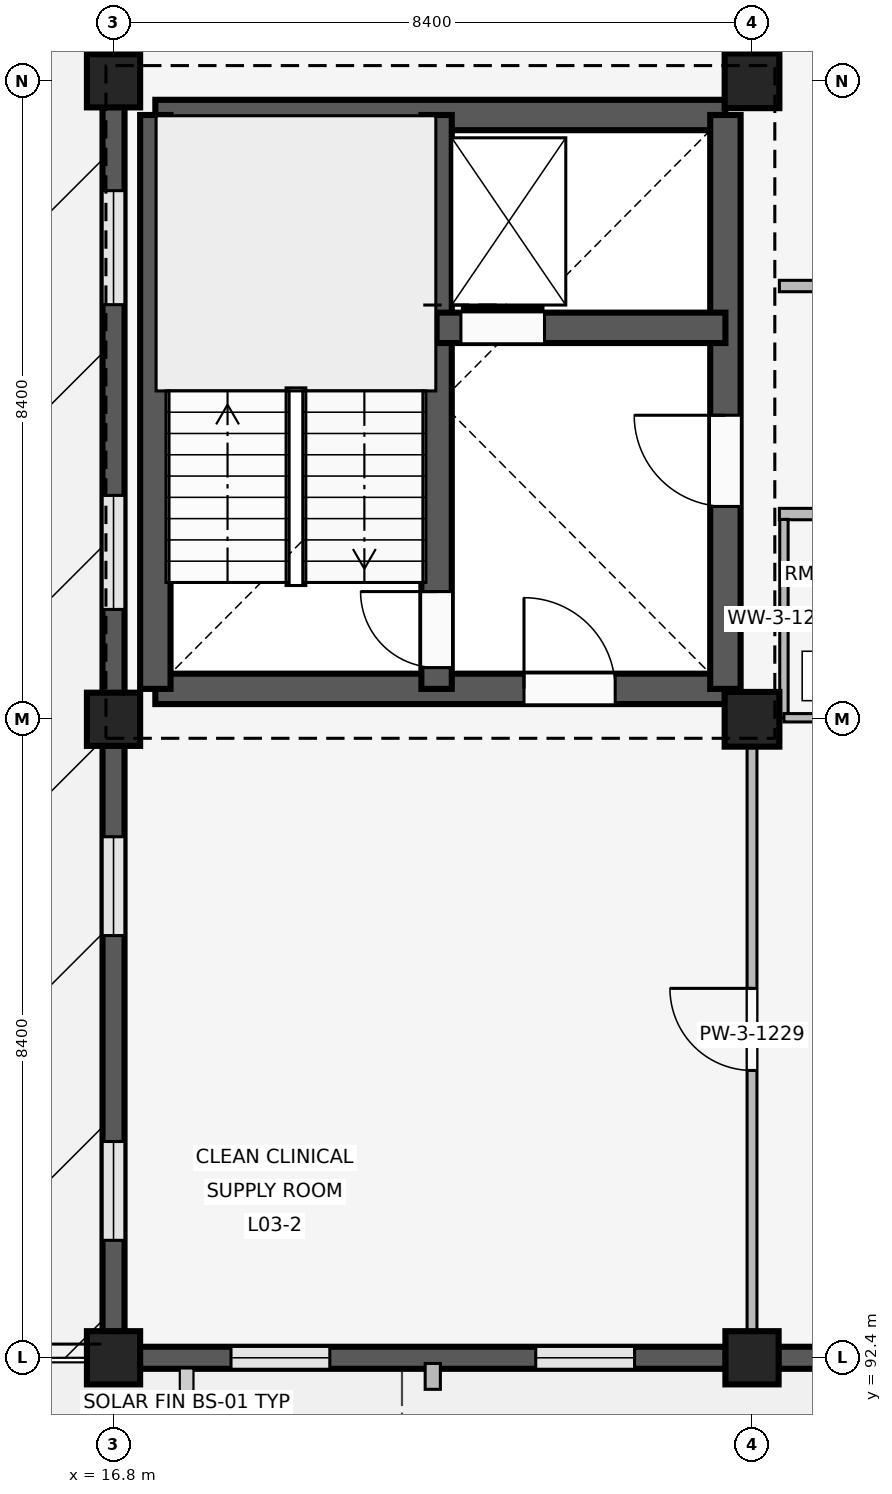
"""IFC4 building model, lengths in metres.
Left out: names, types, materials, properties, quantities, classifications, styles, units other than length and angle.
Written with IfcOpenShell. Run it as: python <this file> out.ifc"""

import sys

from ifc_helpers import new_model, si_unit, direction, frame, frame_2d, origin, origin_2d, place, context, subcontext, project, spatial, rectangle, extrude, element, fill, save


model = new_model("IFC4")
c1 = context("Model", 3, precision=1e-05, world=origin(), true_north=direction((0.0, 1.0)))
c2 = subcontext(c1, "Body", "Model", "MODEL_VIEW")
j1 = project(units=[si_unit("LENGTHUNIT", "METRE"), si_unit("PLANEANGLEUNIT", "RADIAN")], contexts=[c1])
p1 = place(None, origin())
s1 = spatial("IfcSite", under=j1, at=p1, CompositionType="ELEMENT")
p2 = place(p1, origin())
s2 = spatial("IfcBuilding", under=s1, at=p2, CompositionType="ELEMENT")
p3 = place(p2, frame((0.0, 0.0, 12.9)))
s3 = spatial("IfcBuildingStorey", under=s2, at=p3, CompositionType="ELEMENT", Elevation=12.9)
for number, where, z_axis, x_axis in (
    (1, (16.8, 92.4, 0.0), (0.0, 0.0, 1.0), (1.0, 0.0, 0.0)),
    (2, (16.8, 100.8, 0.0), (0.0, 0.0, 1.0), (1.0, 0.0, 0.0)),
    (3, (16.8, 109.2, 0.0), (0.0, 0.0, 1.0), (1.0, 0.0, 0.0)),
    (4, (25.2, 92.4, 0.0), (0.0, 0.0, 1.0), (1.0, 0.0, 0.0)),
):
    element("IfcColumn", number, at=place(p3, frame(where, z_axis=z_axis, x_axis=x_axis)), inside=s3, PredefinedType="COLUMN", context=c2, shape_type="SweptSolid", body=[
        extrude(rectangle(XDim=0.7, YDim=0.7, at=origin_2d()), origin(), (0.0, 0.0, 1.0), 3.3),
    ])
for number, where, z_axis, x_axis in (
    (5, (25.2, 100.8, 0.0), (0.0, 0.0, 1.0), (1.0, 0.0, 0.0)),
    (6, (25.2, 109.2, 0.0), (0.0, 0.0, 1.0), (1.0, 0.0, 0.0)),
):
    element("IfcColumn", number, at=place(p3, frame(where, z_axis=z_axis, x_axis=x_axis)), inside=s3, PredefinedType="COLUMN", context=c2, shape_type="SweptSolid", body=[
        extrude(rectangle(XDim=0.72, YDim=0.72, at=origin_2d()), origin(), (0.0, 0.0, 1.0), 3.3),
    ])
p4 = place(p3, frame((24.855, 92.4, 0.0), z_axis=(0.0, 0.0, 1.0), x_axis=(-1.0, 0.0, 0.0)))
e7 = element("IfcWall", 7, at=p4, inside=s3, PredefinedType="SOLIDWALL", context=c2, shape_type="SweptSolid", body=[
    extrude(rectangle(XDim=7.71, YDim=0.29, at=frame_2d((3.855, 0.0))), origin(), (0.0, 0.0, 1.0), 2.44),
])
p5 = place(p4, frame((1.2, 0.0, 1.05)))
e8 = element("IfcOpeningElement", 8, at=p5, cuts=e7, PredefinedType="OPENING", context=c2, shape_type="SweptSolid", body=[
    extrude(rectangle(XDim=1.3, YDim=0.75, at=frame_2d((0.65, 0.375))), frame((0.0, 0.155, 0.0), z_axis=(0.0, -1.0, 0.0), x_axis=(1.0, 0.0, 0.0)), (0.0, 0.0, 1.0), 0.31),
])
p6 = place(p4, frame((5.21, 0.0, 1.05)))
e9 = element("IfcOpeningElement", 9, at=p6, cuts=e7, PredefinedType="OPENING", context=c2, shape_type="SweptSolid", body=[
    extrude(rectangle(XDim=1.3, YDim=0.75, at=frame_2d((0.65, 0.375))), frame((0.0, 0.155, 0.0), z_axis=(0.0, -1.0, 0.0), x_axis=(1.0, 0.0, 0.0)), (0.0, 0.0, 1.0), 0.31),
])
p7 = place(p3, frame((21.0, 92.325, 0.0), z_axis=(0.0, 0.0, 1.0), x_axis=(0.0, -1.0, 0.0)))
e10 = element("IfcWall", 10, at=p7, inside=s3, PredefinedType="ELEMENTEDWALL", context=c2, shape_type="SweptSolid", body=[
    extrude(rectangle(XDim=0.34, YDim=0.2, at=frame_2d((0.17, 0.0))), origin(), (0.0, 0.0, 1.0), 2.42),
])
p8 = place(p3, frame((16.8, 92.745, 0.0), z_axis=(0.0, 0.0, 1.0), x_axis=(0.0, 1.0, 0.0)))
e11 = element("IfcWall", 11, at=p8, inside=s3, PredefinedType="SOLIDWALL", context=c2, shape_type="SweptSolid", body=[
    extrude(rectangle(XDim=7.71, YDim=0.29, at=frame_2d((3.855, 0.0))), origin(), (0.0, 0.0, 1.0), 2.44),
])
p9 = place(p8, frame((1.2, 0.0, 1.05)))
e12 = element("IfcOpeningElement", 12, at=p9, cuts=e11, PredefinedType="OPENING", context=c2, shape_type="SweptSolid", body=[
    extrude(rectangle(XDim=1.3, YDim=0.75, at=frame_2d((0.65, 0.375))), frame((0.0, 0.155, 0.0), z_axis=(0.0, -1.0, 0.0), x_axis=(1.0, 0.0, 0.0)), (0.0, 0.0, 1.0), 0.31),
])
p10 = place(p8, frame((5.21, 0.0, 1.05)))
e13 = element("IfcOpeningElement", 13, at=p10, cuts=e11, PredefinedType="OPENING", context=c2, shape_type="SweptSolid", body=[
    extrude(rectangle(XDim=1.3, YDim=0.75, at=frame_2d((0.65, 0.375))), frame((0.0, 0.155, 0.0), z_axis=(0.0, -1.0, 0.0), x_axis=(1.0, 0.0, 0.0)), (0.0, 0.0, 1.0), 0.31),
])
p11 = place(p3, frame((16.8, 101.145, 0.0), z_axis=(0.0, 0.0, 1.0), x_axis=(0.0, 1.0, 0.0)))
e14 = element("IfcWall", 14, at=p11, inside=s3, PredefinedType="SOLIDWALL", context=c2, shape_type="SweptSolid", body=[
    extrude(rectangle(XDim=7.71, YDim=0.29, at=frame_2d((3.855, 0.0))), origin(), (0.0, 0.0, 1.0), 2.44),
])
p12 = place(p11, frame((1.1, 0.0, 1.05)))
e15 = element("IfcOpeningElement", 15, at=p12, cuts=e14, PredefinedType="OPENING", context=c2, shape_type="SweptSolid", body=[
    extrude(rectangle(XDim=1.5, YDim=0.75, at=frame_2d((0.75, 0.375))), frame((0.0, 0.155, 0.0), z_axis=(0.0, -1.0, 0.0), x_axis=(1.0, 0.0, 0.0)), (0.0, 0.0, 1.0), 0.31),
])
p13 = place(p11, frame((5.11, 0.0, 1.05)))
e16 = element("IfcOpeningElement", 16, at=p13, cuts=e14, PredefinedType="OPENING", context=c2, shape_type="SweptSolid", body=[
    extrude(rectangle(XDim=1.5, YDim=0.75, at=frame_2d((0.75, 0.375))), frame((0.0, 0.155, 0.0), z_axis=(0.0, -1.0, 0.0), x_axis=(1.0, 0.0, 0.0)), (0.0, 0.0, 1.0), 0.31),
])
p14 = place(p3, frame((16.8, 109.545, 0.0), z_axis=(0.0, 0.0, 1.0), x_axis=(0.0, 1.0, 0.0)))
e17 = element("IfcWall", 17, at=p14, inside=s3, PredefinedType="SOLIDWALL", context=c2, shape_type="SweptSolid", body=[
    extrude(rectangle(XDim=7.71, YDim=0.29, at=frame_2d((3.855, 0.0))), origin(), (0.0, 0.0, 1.0), 2.44),
])
p15 = place(p14, frame((3.255, 0.0, 0.0)))
e18 = element("IfcOpeningElement", 18, at=p15, cuts=e17, PredefinedType="OPENING", context=c2, shape_type="SweptSolid", body=[
    extrude(rectangle(XDim=1.2, YDim=2.25, at=frame_2d((0.6, 1.125))), frame((0.0, 0.155, 0.0), z_axis=(0.0, -1.0, 0.0), x_axis=(1.0, 0.0, 0.0)), (0.0, 0.0, 1.0), 0.31),
])
p16 = place(p3, frame((33.255, 92.4, 0.0), z_axis=(0.0, 0.0, 1.0), x_axis=(-1.0, 0.0, 0.0)))
e19 = element("IfcWall", 19, at=p16, inside=s3, PredefinedType="SOLIDWALL", context=c2, shape_type="SweptSolid", body=[
    extrude(rectangle(XDim=7.71, YDim=0.29, at=frame_2d((3.855, 0.0))), origin(), (0.0, 0.0, 1.0), 2.44),
])
p17 = place(p16, frame((1.1, 0.0, 1.05)))
e20 = element("IfcOpeningElement", 20, at=p17, cuts=e19, PredefinedType="OPENING", context=c2, shape_type="SweptSolid", body=[
    extrude(rectangle(XDim=1.5, YDim=0.75, at=frame_2d((0.75, 0.375))), frame((0.0, 0.155, 0.0), z_axis=(0.0, -1.0, 0.0), x_axis=(1.0, 0.0, 0.0)), (0.0, 0.0, 1.0), 0.31),
])
p18 = place(p16, frame((5.11, 0.0, 1.05)))
e21 = element("IfcOpeningElement", 21, at=p18, cuts=e19, PredefinedType="OPENING", context=c2, shape_type="SweptSolid", body=[
    extrude(rectangle(XDim=1.5, YDim=0.75, at=frame_2d((0.75, 0.375))), frame((0.0, 0.155, 0.0), z_axis=(0.0, -1.0, 0.0), x_axis=(1.0, 0.0, 0.0)), (0.0, 0.0, 1.0), 0.31),
])
p19 = place(p3, frame((17.35, 101.2, 0.0), z_axis=(0.0, 0.0, 1.0), x_axis=(1.0, 0.0, 0.0)))
e22 = element("IfcWall", 22, at=p19, inside=s3, PredefinedType="SHEAR", context=c2, shape_type="SweptSolid", body=[
    extrude(rectangle(XDim=7.5, YDim=0.4, at=frame_2d((3.75, 0.0))), origin(), (0.0, 0.0, 1.0), 3.02),
])
p20 = place(p19, frame((4.85, 0.0, 0.0)))
e23 = element("IfcOpeningElement", 23, at=p20, cuts=e22, PredefinedType="OPENING", context=c2, shape_type="SweptSolid", body=[
    extrude(rectangle(XDim=1.2, YDim=2.2, at=frame_2d((0.6, 1.1))), frame((0.0, 0.21, 0.0), z_axis=(0.0, -1.0, 0.0), x_axis=(1.0, 0.0, 0.0)), (0.0, 0.0, 1.0), 0.42),
])
p21 = place(p3, frame((17.35, 108.75, 0.0), z_axis=(0.0, 0.0, 1.0), x_axis=(1.0, 0.0, 0.0)))
e24 = element("IfcWall", 24, at=p21, inside=s3, PredefinedType="SHEAR", context=c2, shape_type="SweptSolid", body=[
    extrude(rectangle(XDim=7.5, YDim=0.4, at=frame_2d((3.75, 0.0))), origin(), (0.0, 0.0, 1.0), 3.02),
])
p22 = place(p3, frame((17.35, 101.2, 0.0), z_axis=(0.0, 0.0, 1.0), x_axis=(0.0, 1.0, 0.0)))
e25 = element("IfcWall", 25, at=p22, inside=s3, PredefinedType="SHEAR", context=c2, shape_type="SweptSolid", body=[
    extrude(rectangle(XDim=7.55, YDim=0.4, at=frame_2d((3.775, 0.0))), origin(), (0.0, 0.0, 1.0), 3.02),
])
p23 = place(p3, frame((24.85, 101.2, 0.0), z_axis=(0.0, 0.0, 1.0), x_axis=(0.0, 1.0, 0.0)))
e26 = element("IfcWall", 26, at=p23, inside=s3, PredefinedType="SHEAR", context=c2, shape_type="SweptSolid", body=[
    extrude(rectangle(XDim=7.55, YDim=0.4, at=frame_2d((3.775, 0.0))), origin(), (0.0, 0.0, 1.0), 3.02),
])
p24 = place(p23, frame((2.4, 0.0, 0.0)))
e27 = element("IfcOpeningElement", 27, at=p24, cuts=e26, PredefinedType="OPENING", context=c2, shape_type="SweptSolid", body=[
    extrude(rectangle(XDim=1.2, YDim=2.2, at=frame_2d((0.6, 1.1))), frame((0.0, 0.21, 0.0), z_axis=(0.0, -1.0, 0.0), x_axis=(1.0, 0.0, 0.0)), (0.0, 0.0, 1.0), 0.42),
])
p25 = place(p3, frame((21.05, 101.2, 0.0), z_axis=(0.0, 0.0, 1.0), x_axis=(0.0, 1.0, 0.0)))
e28 = element("IfcWall", 28, at=p25, inside=s3, PredefinedType="SHEAR", context=c2, shape_type="SweptSolid", body=[
    extrude(rectangle(XDim=7.55, YDim=0.4, at=frame_2d((3.775, 0.0))), origin(), (0.0, 0.0, 1.0), 3.02),
])
p26 = place(p25, frame((0.28, 0.0, 0.0)))
e29 = element("IfcOpeningElement", 29, at=p26, cuts=e28, PredefinedType="OPENING", context=c2, shape_type="SweptSolid", body=[
    extrude(rectangle(XDim=1.0, YDim=2.15, at=frame_2d((0.5, 1.075))), frame((0.0, 0.21, 0.0), z_axis=(0.0, -1.0, 0.0), x_axis=(1.0, 0.0, 0.0)), (0.0, 0.0, 1.0), 0.42),
])
p27 = place(p3, frame((21.05, 105.95, 0.0), z_axis=(0.0, 0.0, 1.0), x_axis=(1.0, 0.0, 0.0)))
e30 = element("IfcWall", 30, at=p27, inside=s3, PredefinedType="SHEAR", context=c2, shape_type="SweptSolid", body=[
    extrude(rectangle(XDim=3.8, YDim=0.4, at=frame_2d((1.9, 0.0))), origin(), (0.0, 0.0, 1.0), 3.02),
])
p28 = place(p27, frame((0.32, 0.0, 0.0)))
e31 = element("IfcOpeningElement", 31, at=p28, cuts=e30, PredefinedType="OPENING", context=c2, shape_type="SweptSolid", body=[
    extrude(rectangle(XDim=1.1, YDim=2.15, at=frame_2d((0.55, 1.075))), frame((0.0, 0.21, 0.0), z_axis=(0.0, -1.0, 0.0), x_axis=(1.0, 0.0, 0.0)), (0.0, 0.0, 1.0), 0.42),
])
p29 = place(p3, frame((25.2, 92.54, 0.0), z_axis=(0.0, 0.0, 1.0), x_axis=(0.0, 1.0, 0.0)))
e32 = element("IfcWall", 32, at=p29, inside=s3, PredefinedType="PARTITIONING", context=c2, shape_type="SweptSolid", body=[
    extrude(rectangle(XDim=8.21, YDim=0.13, at=frame_2d((4.105, 0.0))), origin(), (0.0, 0.0, 1.0), 2.42),
])
p30 = place(p29, frame((3.64, 0.0, 0.0)))
e33 = element("IfcOpeningElement", 33, at=p30, cuts=e32, PredefinedType="OPENING", context=c2, shape_type="SweptSolid", body=[
    extrude(rectangle(XDim=1.08, YDim=2.15, at=frame_2d((0.54, 1.075))), frame((0.0, 0.075, 0.0), z_axis=(0.0, -1.0, 0.0), x_axis=(1.0, 0.0, 0.0)), (0.0, 0.0, 1.0), 0.15),
])
p31 = place(p3, frame((25.2, 109.55, 0.0), z_axis=(0.0, 0.0, 1.0), x_axis=(0.0, 1.0, 0.0)))
e34 = element("IfcWall", 34, at=p31, inside=s3, PredefinedType="PARTITIONING", context=c2, shape_type="SweptSolid", body=[
    extrude(rectangle(XDim=7.91, YDim=0.13, at=frame_2d((3.955, 0.0))), origin(), (0.0, 0.0, 1.0), 2.42),
])
p32 = place(p31, frame((3.4, 0.0, 0.0)))
e35 = element("IfcOpeningElement", 35, at=p32, cuts=e34, PredefinedType="OPENING", context=c2, shape_type="SweptSolid", body=[
    extrude(rectangle(XDim=1.05, YDim=2.2, at=frame_2d((0.525, 1.1))), frame((0.0, 0.075, 0.0), z_axis=(0.0, -1.0, 0.0), x_axis=(1.0, 0.0, 0.0)), (0.0, 0.0, 1.0), 0.15),
])
p33 = place(p3, frame((25.56, 103.5, 0.0), z_axis=(0.0, 0.0, 1.0), x_axis=(1.0, 0.0, 0.0)))
e36 = element("IfcWall", 36, at=p33, inside=s3, PredefinedType="PARTITIONING", context=c2, shape_type="SweptSolid", body=[
    extrude(rectangle(XDim=7.96, YDim=0.15, at=frame_2d((3.98, 0.0))), origin(), (0.0, 0.0, 1.0), 2.42),
])
p34 = place(p33, frame((2.25, 0.0, 0.0)))
e37 = element("IfcOpeningElement", 37, at=p34, cuts=e36, PredefinedType="OPENING", context=c2, shape_type="SweptSolid", body=[
    extrude(rectangle(XDim=1.32, YDim=2.25, at=frame_2d((0.66, 1.125))), frame((0.0, 0.085, 0.0), z_axis=(0.0, -1.0, 0.0), x_axis=(1.0, 0.0, 0.0)), (0.0, 0.0, 1.0), 0.17),
])
p35 = place(p33, frame((5.95, 0.0, 0.0)))
e38 = element("IfcOpeningElement", 38, at=p35, cuts=e36, PredefinedType="OPENING", context=c2, shape_type="SweptSolid", body=[
    extrude(rectangle(XDim=1.32, YDim=2.25, at=frame_2d((0.66, 1.125))), frame((0.0, 0.085, 0.0), z_axis=(0.0, -1.0, 0.0), x_axis=(1.0, 0.0, 0.0)), (0.0, 0.0, 1.0), 0.17),
])
p36 = place(p3, frame((25.62, 100.82, 0.0), z_axis=(0.0, 0.0, 1.0), x_axis=(0.0, 1.0, 0.0)))
e39 = element("IfcWall", 39, at=p36, inside=s3, PredefinedType="PARTITIONING", context=c2, shape_type="SweptSolid", body=[
    extrude(rectangle(XDim=2.61, YDim=0.11, at=frame_2d((1.305, 0.0))), origin(), (0.0, 0.0, 1.0), 2.42),
])
p37 = place(p3, frame((25.62, 100.82, 0.0), z_axis=(0.0, 0.0, 1.0), x_axis=(1.0, 0.0, 0.0)))
e40 = element("IfcWall", 40, at=p37, inside=s3, PredefinedType="PARTITIONING", context=c2, shape_type="SweptSolid", body=[
    extrude(rectangle(XDim=1.98, YDim=0.11, at=frame_2d((0.99, 0.0))), origin(), (0.0, 0.0, 1.0), 2.42),
])
p38 = place(p37, frame((0.54, 0.0, 0.0)))
e41 = element("IfcOpeningElement", 41, at=p38, cuts=e40, PredefinedType="OPENING", context=c2, shape_type="SweptSolid", body=[
    extrude(rectangle(XDim=0.9, YDim=2.1, at=frame_2d((0.45, 1.05))), frame((0.0, 0.065, 0.0), z_axis=(0.0, -1.0, 0.0), x_axis=(1.0, 0.0, 0.0)), (0.0, 0.0, 1.0), 0.13),
])
p39 = place(p3, frame((33.52, 106.5, 0.0), z_axis=(0.0, 0.0, 1.0), x_axis=(-1.0, 0.0, 0.0)))
e42 = element("IfcWall", 42, at=p39, inside=s3, PredefinedType="PARTITIONING", context=c2, shape_type="SweptSolid", body=[
    extrude(rectangle(XDim=7.96, YDim=0.15, at=frame_2d((3.98, 0.0))), origin(), (0.0, 0.0, 1.0), 2.42),
])
p40 = place(p39, frame((3.355, 0.0, 0.0)))
e43 = element("IfcOpeningElement", 43, at=p40, cuts=e42, PredefinedType="OPENING", context=c2, shape_type="SweptSolid", body=[
    extrude(rectangle(XDim=1.25, YDim=2.2, at=frame_2d((0.625, 1.1))), frame((0.0, 0.085, 0.0), z_axis=(0.0, -1.0, 0.0), x_axis=(1.0, 0.0, 0.0)), (0.0, 0.0, 1.0), 0.17),
])
p41 = place(p5, origin())
e44 = element("IfcWindow", 44, at=p41, inside=s3, PartitioningType="SINGLE_PANEL", PredefinedType="WINDOW", context=c2, shape_type="SweptSolid", body=[
    extrude(rectangle(XDim=1.3, YDim=0.75, at=frame_2d((0.65, 0.375))), frame((0.0, 0.03, 0.0), z_axis=(0.0, -1.0, 0.0), x_axis=(1.0, 0.0, 0.0)), (0.0, 0.0, 1.0), 0.06),
])
fill(e8, e44)
p42 = place(p6, origin())
e45 = element("IfcWindow", 45, at=p42, inside=s3, PartitioningType="SINGLE_PANEL", PredefinedType="WINDOW", context=c2, shape_type="SweptSolid", body=[
    extrude(rectangle(XDim=1.3, YDim=0.75, at=frame_2d((0.65, 0.375))), frame((0.0, 0.03, 0.0), z_axis=(0.0, -1.0, 0.0), x_axis=(1.0, 0.0, 0.0)), (0.0, 0.0, 1.0), 0.06),
])
fill(e9, e45)
p43 = place(p9, origin())
e46 = element("IfcWindow", 46, at=p43, inside=s3, PartitioningType="SINGLE_PANEL", PredefinedType="WINDOW", context=c2, shape_type="SweptSolid", body=[
    extrude(rectangle(XDim=1.3, YDim=0.75, at=frame_2d((0.65, 0.375))), frame((0.0, 0.03, 0.0), z_axis=(0.0, -1.0, 0.0), x_axis=(1.0, 0.0, 0.0)), (0.0, 0.0, 1.0), 0.06),
])
fill(e12, e46)
p44 = place(p10, origin())
e47 = element("IfcWindow", 47, at=p44, inside=s3, PartitioningType="SINGLE_PANEL", PredefinedType="WINDOW", context=c2, shape_type="SweptSolid", body=[
    extrude(rectangle(XDim=1.3, YDim=0.75, at=frame_2d((0.65, 0.375))), frame((0.0, 0.03, 0.0), z_axis=(0.0, -1.0, 0.0), x_axis=(1.0, 0.0, 0.0)), (0.0, 0.0, 1.0), 0.06),
])
fill(e13, e47)
p45 = place(p12, origin())
e48 = element("IfcWindow", 48, at=p45, inside=s3, PartitioningType="SINGLE_PANEL", PredefinedType="WINDOW", context=c2, shape_type="SweptSolid", body=[
    extrude(rectangle(XDim=1.5, YDim=0.75, at=frame_2d((0.75, 0.375))), frame((0.0, 0.03, 0.0), z_axis=(0.0, -1.0, 0.0), x_axis=(1.0, 0.0, 0.0)), (0.0, 0.0, 1.0), 0.06),
])
fill(e15, e48)
p46 = place(p13, origin())
e49 = element("IfcWindow", 49, at=p46, inside=s3, PartitioningType="SINGLE_PANEL", PredefinedType="WINDOW", context=c2, shape_type="SweptSolid", body=[
    extrude(rectangle(XDim=1.5, YDim=0.75, at=frame_2d((0.75, 0.375))), frame((0.0, 0.03, 0.0), z_axis=(0.0, -1.0, 0.0), x_axis=(1.0, 0.0, 0.0)), (0.0, 0.0, 1.0), 0.06),
])
fill(e16, e49)
p47 = place(p24, origin())
e50 = element("IfcDoor", 50, at=p47, inside=s3, OperationType="SINGLE_SWING_RIGHT", PredefinedType="DOOR", context=c2, shape_type="SweptSolid", body=[
    extrude(rectangle(XDim=1.2, YDim=2.2, at=frame_2d((0.6, 1.1))), frame((0.0, 0.025, 0.0), z_axis=(0.0, -1.0, 0.0), x_axis=(1.0, 0.0, 0.0)), (0.0, 0.0, 1.0), 0.05),
])
fill(e27, e50)
p48 = place(p20, origin())
e51 = element("IfcDoor", 51, at=p48, inside=s3, OperationType="SINGLE_SWING_LEFT", PredefinedType="DOOR", context=c2, shape_type="SweptSolid", body=[
    extrude(rectangle(XDim=1.2, YDim=2.2, at=frame_2d((0.6, 1.1))), frame((0.0, 0.025, 0.0), z_axis=(0.0, -1.0, 0.0), x_axis=(1.0, 0.0, 0.0)), (0.0, 0.0, 1.0), 0.05),
])
fill(e23, e51)
p49 = place(p26, origin())
e52 = element("IfcDoor", 52, at=p49, inside=s3, OperationType="SINGLE_SWING_RIGHT", PredefinedType="DOOR", context=c2, shape_type="SweptSolid", body=[
    extrude(rectangle(XDim=1.0, YDim=2.15, at=frame_2d((0.5, 1.075))), frame((0.0, 0.025, 0.0), z_axis=(0.0, -1.0, 0.0), x_axis=(1.0, 0.0, 0.0)), (0.0, 0.0, 1.0), 0.05),
])
fill(e29, e52)
p50 = place(p28, origin())
e53 = element("IfcDoor", 53, at=p50, inside=s3, OperationType="SLIDING_TO_LEFT", PredefinedType="DOOR", context=c2, shape_type="SweptSolid", body=[
    extrude(rectangle(XDim=1.1, YDim=2.15, at=frame_2d((0.55, 1.075))), frame((0.0, 0.025, 0.0), z_axis=(0.0, -1.0, 0.0), x_axis=(1.0, 0.0, 0.0)), (0.0, 0.0, 1.0), 0.05),
])
fill(e31, e53)
p51 = place(p30, origin())
e54 = element("IfcDoor", 54, at=p51, inside=s3, OperationType="SINGLE_SWING_RIGHT", PredefinedType="DOOR", context=c2, shape_type="SweptSolid", body=[
    extrude(rectangle(XDim=1.08, YDim=2.15, at=frame_2d((0.54, 1.075))), frame((0.0, 0.025, 0.0), z_axis=(0.0, -1.0, 0.0), x_axis=(1.0, 0.0, 0.0)), (0.0, 0.0, 1.0), 0.05),
])
fill(e33, e54)
save(model, sys.argv[1])
